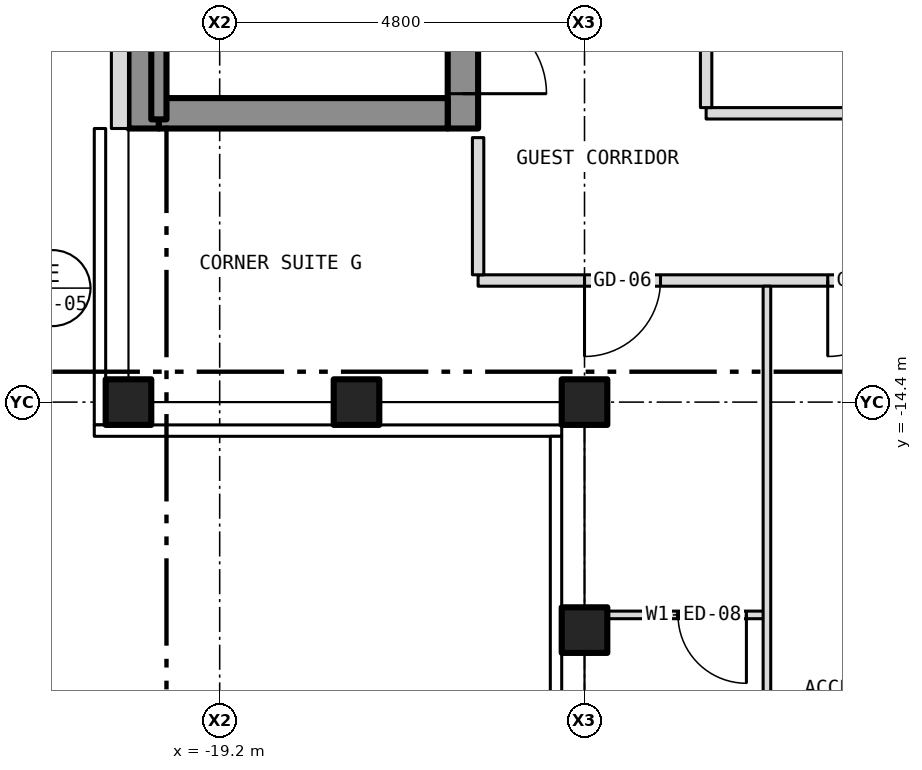
"""IFC4 building model, lengths in metres.
Left out: names, types, materials, properties, quantities, classifications, styles, units other than length and angle.
Written with IfcOpenShell. Run it as: python <this file> out.ifc"""

import sys

from ifc_helpers import new_model, si_unit, direction, frame, frame_2d, origin, origin_2d, place, context, subcontext, project, spatial, rectangle, hollow_rectangle, extrude, element, fill, save


model = new_model("IFC4")
c1 = context("Model", 3, precision=1e-05, world=origin(), true_north=direction((0.0, 1.0)))
c2 = subcontext(c1, "Body", "Model", "MODEL_VIEW")
j1 = project(units=[si_unit("LENGTHUNIT", "METRE"), si_unit("PLANEANGLEUNIT", "RADIAN")], contexts=[c1])
p1 = place(None, origin())
s1 = spatial("IfcSite", under=j1, at=p1, CompositionType="ELEMENT")
p2 = place(p1, origin())
s2 = spatial("IfcBuilding", under=s1, at=p2, CompositionType="ELEMENT")
p3 = place(p2, frame((0.0, 0.0, 244.5)))
s3 = spatial("IfcBuildingStorey", under=s2, at=p3, CompositionType="ELEMENT", Elevation=244.5)
for number, where, z_axis, x_axis in (
    (1, (-20.4, -14.4, -0.15), (0.0, 0.0, 1.0), (1.0, 0.0, 0.0)),
    (2, (-14.4, -14.4, -0.15), (0.0, 0.0, 1.0), (1.0, 0.0, 0.0)),
    (3, (-14.4, -17.4, -0.15), (0.0, 0.0, 1.0), (1.0, 0.0, 0.0)),
    (4, (-17.4, -14.4, -0.15), (0.0, 0.0, 1.0), (1.0, 0.0, 0.0)),
):
    element("IfcColumn", number, at=place(p3, frame(where, z_axis=z_axis, x_axis=x_axis)), inside=s3, PredefinedType="COLUMN", context=c2, shape_type="SweptSolid", body=[
        extrude(hollow_rectangle(XDim=0.6, YDim=0.6, WallThickness=0.03, at=origin_2d()), origin(), (0.0, 0.0, 1.0), 3.5),
    ])
p4 = place(p3, frame((-16.0, -10.8, 0.0), z_axis=(0.0, 0.0, 1.0), x_axis=(0.0, 1.0, 0.0)))
e5 = element("IfcWall", 5, at=p4, inside=s3, PredefinedType="SHEAR", context=c2, shape_type="SweptSolid", body=[
    extrude(rectangle(XDim=21.6, YDim=0.4, at=frame_2d((10.8, 0.0))), origin(), (0.0, 0.0, 1.0), 3.25),
])
p5 = place(p4, frame((9.4, 0.0, 0.0)))
e6 = element("IfcOpeningElement", 6, at=p5, cuts=e5, PredefinedType="OPENING", context=c2, shape_type="SweptSolid", body=[
    extrude(rectangle(XDim=1.1, YDim=2.1, at=frame_2d((0.55, 1.05))), frame((0.0, 0.212, 0.0), z_axis=(0.0, -1.0, 0.0), x_axis=(1.0, 0.0, 0.0)), (0.0, 0.0, 1.0), 0.424),
])
p6 = place(p4, frame((11.5, 0.0, 0.0)))
e7 = element("IfcOpeningElement", 7, at=p6, cuts=e5, PredefinedType="OPENING", context=c2, shape_type="SweptSolid", body=[
    extrude(rectangle(XDim=1.1, YDim=2.1, at=frame_2d((0.55, 1.05))), frame((0.0, 0.212, 0.0), z_axis=(0.0, -1.0, 0.0), x_axis=(1.0, 0.0, 0.0)), (0.0, 0.0, 1.0), 0.424),
])
p7 = place(p4, frame((13.6, 0.0, 0.0)))
e8 = element("IfcOpeningElement", 8, at=p7, cuts=e5, PredefinedType="OPENING", context=c2, shape_type="SweptSolid", body=[
    extrude(rectangle(XDim=1.1, YDim=2.1, at=frame_2d((0.55, 1.05))), frame((0.0, 0.212, 0.0), z_axis=(0.0, -1.0, 0.0), x_axis=(1.0, 0.0, 0.0)), (0.0, 0.0, 1.0), 0.424),
])
p8 = place(p4, frame((15.7, 0.0, 0.0)))
e9 = element("IfcOpeningElement", 9, at=p8, cuts=e5, PredefinedType="OPENING", context=c2, shape_type="SweptSolid", body=[
    extrude(rectangle(XDim=1.1, YDim=2.1, at=frame_2d((0.55, 1.05))), frame((0.0, 0.212, 0.0), z_axis=(0.0, -1.0, 0.0), x_axis=(1.0, 0.0, 0.0)), (0.0, 0.0, 1.0), 0.424),
])
p9 = place(p4, frame((17.8, 0.0, 0.0)))
e10 = element("IfcOpeningElement", 10, at=p9, cuts=e5, PredefinedType="OPENING", context=c2, shape_type="SweptSolid", body=[
    extrude(rectangle(XDim=1.1, YDim=2.1, at=frame_2d((0.55, 1.05))), frame((0.0, 0.212, 0.0), z_axis=(0.0, -1.0, 0.0), x_axis=(1.0, 0.0, 0.0)), (0.0, 0.0, 1.0), 0.424),
])
p10 = place(p4, frame((0.458, 0.0, 0.0)))
e11 = element("IfcOpeningElement", 11, at=p10, cuts=e5, PredefinedType="OPENING", context=c2, shape_type="SweptSolid", body=[
    extrude(rectangle(XDim=1.1, YDim=2.1, at=frame_2d((0.55, 1.05))), frame((0.0, 0.212, 0.0), z_axis=(0.0, -1.0, 0.0), x_axis=(1.0, 0.0, 0.0)), (0.0, 0.0, 1.0), 0.424),
])
p11 = place(p4, frame((7.5, 0.0, 0.0)))
e12 = element("IfcOpeningElement", 12, at=p11, cuts=e5, PredefinedType="OPENING", context=c2, shape_type="SweptSolid", body=[
    extrude(rectangle(XDim=1.1, YDim=2.1, at=frame_2d((0.55, 1.05))), frame((0.0, 0.212, 0.0), z_axis=(0.0, -1.0, 0.0), x_axis=(1.0, 0.0, 0.0)), (0.0, 0.0, 1.0), 0.424),
])
p12 = place(p4, frame((20.0, 0.0, 0.0)))
e13 = element("IfcOpeningElement", 13, at=p12, cuts=e5, PredefinedType="OPENING", context=c2, shape_type="SweptSolid", body=[
    extrude(rectangle(XDim=0.9, YDim=2.1, at=frame_2d((0.45, 1.05))), frame((0.0, 0.212, 0.0), z_axis=(0.0, -1.0, 0.0), x_axis=(1.0, 0.0, 0.0)), (0.0, 0.0, 1.0), 0.424),
])
p13 = place(p3, frame((-20.2, -10.8, 0.0), z_axis=(0.0, 0.0, 1.0), x_axis=(0.0, 1.0, 0.0)))
e14 = element("IfcWall", 14, at=p13, inside=s3, PredefinedType="SHEAR", context=c2, shape_type="SweptSolid", body=[
    extrude(rectangle(XDim=21.6, YDim=0.4, at=frame_2d((10.8, 0.0))), origin(), (0.0, 0.0, 1.0), 3.25),
])
p14 = place(p3, frame((-20.0, -10.6, 0.0), z_axis=(0.0, 0.0, 1.0), x_axis=(1.0, 0.0, 0.0)))
e15 = element("IfcWall", 15, at=p14, inside=s3, PredefinedType="SHEAR", context=c2, shape_type="SweptSolid", body=[
    extrude(rectangle(XDim=3.8, YDim=0.4, at=frame_2d((1.9, 0.0))), origin(), (0.0, 0.0, 1.0), 3.25),
])
p15 = place(p3, frame((-20.512, 10.8, 0.0), z_axis=(0.0, 0.0, 1.0), x_axis=(0.0, -1.0, 0.0)))
e16 = element("IfcWall", 16, at=p15, inside=s3, PredefinedType="SOLIDWALL", context=c2, shape_type="SweptSolid", body=[
    extrude(rectangle(XDim=21.6, YDim=0.225, at=frame_2d((10.8, 0.0))), origin(), (0.0, 0.0, 1.0), 3.5),
])
p16 = place(p15, frame((18.05, 0.0, 1.0)))
e17 = element("IfcOpeningElement", 17, at=p16, cuts=e16, PredefinedType="OPENING", context=c2, shape_type="SweptSolid", body=[
    extrude(rectangle(XDim=0.6, YDim=1.5, at=frame_2d((0.3, 0.75))), frame((0.0, 0.125, 0.0), z_axis=(0.0, -1.0, 0.0), x_axis=(1.0, 0.0, 0.0)), (0.0, 0.0, 1.0), 0.249),
])
p17 = place(p3, frame((-14.28, -17.2, 0.0), z_axis=(0.0, 0.0, 1.0), x_axis=(1.0, 0.0, 0.0)))
e18 = element("IfcWall", 18, at=p17, inside=s3, PredefinedType="PARTITIONING", context=c2, shape_type="SweptSolid", body=[
    extrude(rectangle(XDim=2.28, YDim=0.1, at=frame_2d((1.14, 0.0))), origin(), (0.0, 0.0, 1.0), 3.35),
])
p18 = place(p17, frame((1.11, 0.0, 0.0)))
e19 = element("IfcOpeningElement", 19, at=p18, cuts=e18, PredefinedType="OPENING", context=c2, shape_type="SweptSolid", body=[
    extrude(rectangle(XDim=0.9, YDim=2.1, at=frame_2d((0.45, 1.05))), frame((0.0, 0.062, 0.0), z_axis=(0.0, -1.0, 0.0), x_axis=(1.0, 0.0, 0.0)), (0.0, 0.0, 1.0), 0.124),
])
p19 = place(p3, frame((-15.8, -12.8, 0.0), z_axis=(0.0, 0.0, 1.0), x_axis=(1.0, 0.0, 0.0)))
e20 = element("IfcWall", 20, at=p19, inside=s3, PredefinedType="PARTITIONING", context=c2, shape_type="SweptSolid", body=[
    extrude(rectangle(XDim=31.6, YDim=0.15, at=frame_2d((15.8, 0.0))), origin(), (0.0, 0.0, 1.0), 3.35),
])
p20 = place(p19, frame((4.6, 0.0, 0.0)))
e21 = element("IfcOpeningElement", 21, at=p20, cuts=e20, PredefinedType="OPENING", context=c2, shape_type="SweptSolid", body=[
    extrude(rectangle(XDim=1.0, YDim=2.1, at=frame_2d((0.5, 1.05))), frame((0.0, 0.087, 0.0), z_axis=(0.0, -1.0, 0.0), x_axis=(1.0, 0.0, 0.0)), (0.0, 0.0, 1.0), 0.174),
])
p21 = place(p19, frame((12.8, 0.0, 0.0)))
e22 = element("IfcOpeningElement", 22, at=p21, cuts=e20, PredefinedType="OPENING", context=c2, shape_type="SweptSolid", body=[
    extrude(rectangle(XDim=1.0, YDim=2.1, at=frame_2d((0.5, 1.05))), frame((0.0, 0.087, 0.0), z_axis=(0.0, -1.0, 0.0), x_axis=(1.0, 0.0, 0.0)), (0.0, 0.0, 1.0), 0.174),
])
p22 = place(p19, frame((18.0, 0.0, 0.0)))
e23 = element("IfcOpeningElement", 23, at=p22, cuts=e20, PredefinedType="OPENING", context=c2, shape_type="SweptSolid", body=[
    extrude(rectangle(XDim=1.0, YDim=2.1, at=frame_2d((0.5, 1.05))), frame((0.0, 0.087, 0.0), z_axis=(0.0, -1.0, 0.0), x_axis=(1.0, 0.0, 0.0)), (0.0, 0.0, 1.0), 0.174),
])
p23 = place(p19, frame((1.4, 0.0, 0.0)))
e24 = element("IfcOpeningElement", 24, at=p23, cuts=e20, PredefinedType="OPENING", context=c2, shape_type="SweptSolid", body=[
    extrude(rectangle(XDim=1.0, YDim=2.1, at=frame_2d((0.5, 1.05))), frame((0.0, 0.087, 0.0), z_axis=(0.0, -1.0, 0.0), x_axis=(1.0, 0.0, 0.0)), (0.0, 0.0, 1.0), 0.174),
])
p24 = place(p19, frame((29.2, 0.0, 0.0)))
e25 = element("IfcOpeningElement", 25, at=p24, cuts=e20, PredefinedType="OPENING", context=c2, shape_type="SweptSolid", body=[
    extrude(rectangle(XDim=1.0, YDim=2.1, at=frame_2d((0.5, 1.05))), frame((0.0, 0.087, 0.0), z_axis=(0.0, -1.0, 0.0), x_axis=(1.0, 0.0, 0.0)), (0.0, 0.0, 1.0), 0.174),
])
p25 = place(p3, frame((-12.8, -10.6, 0.0), z_axis=(0.0, 0.0, 1.0), x_axis=(1.0, 0.0, 0.0)))
e26 = element("IfcWall", 26, at=p25, inside=s3, PredefinedType="PARTITIONING", context=c2, shape_type="SweptSolid", body=[
    extrude(rectangle(XDim=20.3, YDim=0.15, at=frame_2d((10.15, 0.0))), origin(), (0.0, 0.0, 1.0), 3.35),
])
p26 = place(p25, frame((11.3, 0.0, 0.0)))
e27 = element("IfcOpeningElement", 27, at=p26, cuts=e26, PredefinedType="OPENING", context=c2, shape_type="SweptSolid", body=[
    extrude(rectangle(XDim=0.9, YDim=2.1, at=frame_2d((0.45, 1.05))), frame((0.0, 0.087, 0.0), z_axis=(0.0, -1.0, 0.0), x_axis=(1.0, 0.0, 0.0)), (0.0, 0.0, 1.0), 0.174),
])
p27 = place(p3, frame((-20.0, -10.68, 0.0), z_axis=(0.0, 0.0, 1.0), x_axis=(0.0, 1.0, 0.0)))
e28 = element("IfcWall", 28, at=p27, inside=s3, PredefinedType="SHEAR", context=c2, shape_type="SweptSolid", body=[
    extrude(rectangle(XDim=6.98, YDim=0.2, at=frame_2d((3.49, 0.0))), origin(), (0.0, 0.0, 1.0), 3.25),
])
p28 = place(p3, frame((-15.8, -12.725, 0.0), z_axis=(0.0, 0.0, 1.0), x_axis=(0.0, 1.0, 0.0)))
e29 = element("IfcWall", 29, at=p28, inside=s3, PredefinedType="PARTITIONING", context=c2, shape_type="SweptSolid", body=[
    extrude(rectangle(XDim=1.805, YDim=0.15, at=frame_2d((0.903, 0.0))), origin(), (0.0, 0.0, 1.0), 3.35),
])
p29 = place(p3, frame((-12.8, -10.525, 0.0), z_axis=(0.0, 0.0, 1.0), x_axis=(0.0, 1.0, 0.0)))
e30 = element("IfcWall", 30, at=p29, inside=s3, PredefinedType="PARTITIONING", context=c2, shape_type="SweptSolid", body=[
    extrude(rectangle(XDim=8.525, YDim=0.15, at=frame_2d((4.262, 0.0))), origin(), (0.0, 0.0, 1.0), 3.35),
])
p30 = place(p29, frame((3.825, 0.0, 0.0)))
e31 = element("IfcOpeningElement", 31, at=p30, cuts=e30, PredefinedType="OPENING", context=c2, shape_type="SweptSolid", body=[
    extrude(rectangle(XDim=0.9, YDim=2.1, at=frame_2d((0.45, 1.05))), frame((0.0, 0.087, 0.0), z_axis=(0.0, -1.0, 0.0), x_axis=(1.0, 0.0, 0.0)), (0.0, 0.0, 1.0), 0.174),
])
p31 = place(p3, frame((-12.0, -20.73, 0.0), z_axis=(0.0, 0.0, 1.0), x_axis=(0.0, 1.0, 0.0)))
e32 = element("IfcWall", 32, at=p31, inside=s3, PredefinedType="PARTITIONING", context=c2, shape_type="SweptSolid", body=[
    extrude(rectangle(XDim=7.855, YDim=0.1, at=frame_2d((3.927, 0.0))), origin(), (0.0, 0.0, 1.0), 3.35),
])
p32 = place(p10, origin())
e33 = element("IfcDoor", 33, at=p32, inside=s3, OperationType="SINGLE_SWING_LEFT", PredefinedType="DOOR", context=c2, shape_type="SweptSolid", body=[
    extrude(rectangle(XDim=1.1, YDim=2.1, at=frame_2d((0.55, 1.05))), frame((0.0, 0.025, 0.0), z_axis=(0.0, -1.0, 0.0), x_axis=(1.0, 0.0, 0.0)), (0.0, 0.0, 1.0), 0.05),
])
fill(e11, e33)
p33 = place(p20, origin())
e34 = element("IfcDoor", 34, at=p33, inside=s3, OperationType="SINGLE_SWING_LEFT", PredefinedType="DOOR", context=c2, shape_type="SweptSolid", body=[
    extrude(rectangle(XDim=1.0, YDim=2.1, at=frame_2d((0.5, 1.05))), frame((0.0, 0.025, 0.0), z_axis=(0.0, -1.0, 0.0), x_axis=(1.0, 0.0, 0.0)), (0.0, 0.0, 1.0), 0.05),
])
fill(e21, e34)
p34 = place(p18, origin())
e35 = element("IfcDoor", 35, at=p34, inside=s3, OperationType="SINGLE_SWING_RIGHT", PredefinedType="DOOR", context=c2, shape_type="SweptSolid", body=[
    extrude(rectangle(XDim=0.9, YDim=2.1, at=frame_2d((0.45, 1.05))), frame((0.0, 0.025, 0.0), z_axis=(0.0, -1.0, 0.0), x_axis=(1.0, 0.0, 0.0)), (0.0, 0.0, 1.0), 0.05),
])
fill(e19, e35)
p35 = place(p23, origin())
e36 = element("IfcDoor", 36, at=p35, inside=s3, OperationType="SINGLE_SWING_LEFT", PredefinedType="DOOR", context=c2, shape_type="SweptSolid", body=[
    extrude(rectangle(XDim=1.0, YDim=2.1, at=frame_2d((0.5, 1.05))), frame((0.0, 0.025, 0.0), z_axis=(0.0, -1.0, 0.0), x_axis=(1.0, 0.0, 0.0)), (0.0, 0.0, 1.0), 0.05),
])
fill(e24, e36)
save(model, sys.argv[1])
